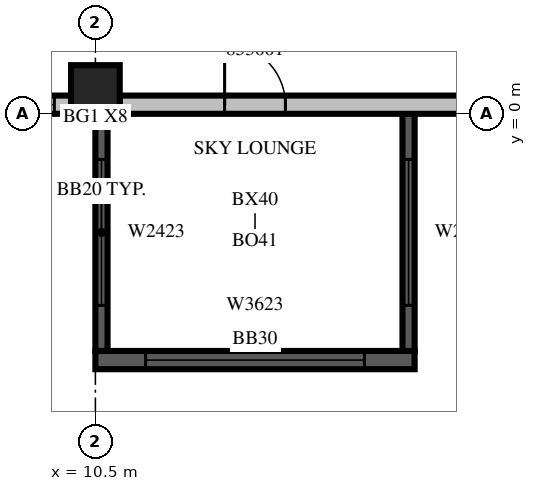
"""IFC4 building model, lengths in metres.
Left out: names, types, materials, properties, quantities, classifications, styles, units other than length and angle.
Written with IfcOpenShell. Run it as: python <this file> out.ifc"""

import sys

from ifc_helpers import new_model, si_unit, direction, frame, frame_2d, origin, origin_2d, place, context, subcontext, project, spatial, rectangle, extrude, source, transform, mapped, element, fill, save


model = new_model("IFC4")
c1 = context("Model", 3, precision=1e-05, world=origin(), true_north=direction((0.0, 1.0)))
c2 = subcontext(c1, "Body", "Model", "MODEL_VIEW")
j1 = project(units=[si_unit("LENGTHUNIT", "METRE"), si_unit("PLANEANGLEUNIT", "RADIAN")], contexts=[c1])
p1 = place(None, origin())
s1 = spatial("IfcSite", under=j1, at=p1, CompositionType="ELEMENT")
p2 = place(p1, origin())
s2 = spatial("IfcBuilding", under=s1, at=p2, CompositionType="ELEMENT")
p3 = place(p2, frame((0.0, 0.0, 234.8)))
s3 = spatial("IfcBuildingStorey", under=s2, at=p3, CompositionType="ELEMENT", Elevation=234.8)
m1 = source(origin(), c2, "Body", "SweptSolid", [
    extrude(rectangle(XDim=0.8, YDim=0.8, at=origin_2d()), origin(), (0.0, 0.0, 1.0), 3.8),
])
p4 = place(p3, frame((10.5, 0.4, 0.0), z_axis=(0.0, 0.0, 1.0), x_axis=(1.0, 0.0, 0.0)))
e1 = element("IfcColumn", 1, at=p4, inside=s3, PredefinedType="COLUMN", context=c2, shape_type="MappedRepresentation", body=[
    mapped(m1, transform((0.0, 0.0, 0.0), scale=1.0)),
])
m2 = source(origin(), c2, "Body", "SweptSolid", [
    extrude(rectangle(XDim=5.25, YDim=0.3, at=frame_2d((2.625, 0.0))), origin(), (0.0, 0.0, 1.0), 3.4),
])
p5 = place(p3, frame((10.5, -4.05, 0.0), z_axis=(0.0, 0.0, 1.0), x_axis=(1.0, 0.0, 0.0)))
e2 = element("IfcWall", 2, at=p5, inside=s3, PredefinedType="SOLIDWALL", context=c2, shape_type="MappedRepresentation", body=[
    mapped(m2, transform((0.0, 0.0, 0.0), scale=1.0)),
])
m3 = source(origin(), c2, "Body", "SweptSolid", [
    extrude(rectangle(XDim=3.6, YDim=2.3, at=frame_2d((1.8, 1.15))), frame((0.0, 0.16, 0.0), z_axis=(0.0, -1.0, 0.0), x_axis=(1.0, 0.0, 0.0)), (0.0, 0.0, 1.0), 0.32),
])
p6 = place(p5, frame((0.825, 0.0, 0.6)))
e3 = element("IfcOpeningElement", 3, at=p6, cuts=e2, PredefinedType="OPENING", context=c2, shape_type="MappedRepresentation", body=[
    mapped(m3, transform((0.0, 0.0, 0.0), scale=1.0)),
])
m4 = source(origin(), c2, "Body", "SweptSolid", [
    extrude(rectangle(XDim=3.9, YDim=0.2, at=frame_2d((1.95, 0.0))), origin(), (0.0, 0.0, 1.0), 3.4),
])
p7 = place(p3, frame((10.6, 0.0, 0.0), z_axis=(0.0, 0.0, 1.0), x_axis=(0.0, -1.0, 0.0)))
e4 = element("IfcWall", 4, at=p7, inside=s3, PredefinedType="SOLIDWALL", context=c2, shape_type="MappedRepresentation", body=[
    mapped(m4, transform((0.0, 0.0, 0.0), scale=1.0)),
])
m5 = source(origin(), c2, "Body", "SweptSolid", [
    extrude(rectangle(XDim=2.4, YDim=2.3, at=frame_2d((1.2, 1.15))), frame((0.0, 0.11, 0.0), z_axis=(0.0, -1.0, 0.0), x_axis=(1.0, 0.0, 0.0)), (0.0, 0.0, 1.0), 0.22),
])
p8 = place(p7, frame((0.75, 0.0, 0.6)))
e5 = element("IfcOpeningElement", 5, at=p8, cuts=e4, PredefinedType="OPENING", context=c2, shape_type="MappedRepresentation", body=[
    mapped(m5, transform((0.0, 0.0, 0.0), scale=1.0)),
])
p9 = place(p3, frame((15.65, 0.0, 0.0), z_axis=(0.0, 0.0, 1.0), x_axis=(0.0, -1.0, 0.0)))
e6 = element("IfcWall", 6, at=p9, inside=s3, PredefinedType="SOLIDWALL", context=c2, shape_type="MappedRepresentation", body=[
    mapped(m4, transform((0.0, 0.0, 0.0), scale=1.0)),
])
p10 = place(p9, frame((0.75, 0.0, 0.6)))
e7 = element("IfcOpeningElement", 7, at=p10, cuts=e6, PredefinedType="OPENING", context=c2, shape_type="MappedRepresentation", body=[
    mapped(m5, transform((0.0, 0.0, 0.0), scale=1.0)),
])
m6 = source(origin(), c2, "Body", "SweptSolid", [
    extrude(rectangle(XDim=5.9, YDim=0.3, at=frame_2d((2.95, 0.0))), origin(), (0.0, 0.0, 1.0), 3.4),
])
p11 = place(p3, frame((4.2, 0.15, 0.0), z_axis=(0.0, 0.0, 1.0), x_axis=(1.0, 0.0, 0.0)))
e8 = element("IfcWall", 8, at=p11, inside=s3, PredefinedType="STANDARD", context=c2, shape_type="MappedRepresentation", body=[
    mapped(m6, transform((0.0, 0.0, 0.0), scale=1.0)),
])
m7 = source(origin(), c2, "Body", "SweptSolid", [
    extrude(rectangle(XDim=1.8, YDim=2.3, at=frame_2d((0.9, 1.15))), frame((0.0, 0.16, 0.0), z_axis=(0.0, -1.0, 0.0), x_axis=(1.0, 0.0, 0.0)), (0.0, 0.0, 1.0), 0.32),
])
p12 = place(p11, frame((0.675, 0.0, 0.6)))
e9 = element("IfcOpeningElement", 9, at=p12, cuts=e8, PredefinedType="OPENING", context=c2, shape_type="MappedRepresentation", body=[
    mapped(m7, transform((0.0, 0.0, 0.0), scale=1.0)),
])
p13 = place(p11, frame((3.825, 0.0, 0.6)))
e10 = element("IfcOpeningElement", 10, at=p13, cuts=e8, PredefinedType="OPENING", context=c2, shape_type="MappedRepresentation", body=[
    mapped(m7, transform((0.0, 0.0, 0.0), scale=1.0)),
])
m8 = source(origin(), c2, "Body", "SweptSolid", [
    extrude(rectangle(XDim=9.7, YDim=0.3, at=frame_2d((4.85, 0.0))), origin(), (0.0, 0.0, 1.0), 3.4),
])
p14 = place(p3, frame((10.9, 0.15, 0.0), z_axis=(0.0, 0.0, 1.0), x_axis=(1.0, 0.0, 0.0)))
e11 = element("IfcWall", 11, at=p14, inside=s3, PredefinedType="STANDARD", context=c2, shape_type="MappedRepresentation", body=[
    mapped(m8, transform((0.0, 0.0, 0.0), scale=1.0)),
])
p15 = place(p14, frame((5.675, 0.0, 0.6)))
e12 = element("IfcOpeningElement", 12, at=p15, cuts=e11, PredefinedType="OPENING", context=c2, shape_type="MappedRepresentation", body=[
    mapped(m3, transform((0.0, 0.0, 0.0), scale=1.0)),
])
m9 = source(origin(), c2, "Body", "SweptSolid", [
    extrude(rectangle(XDim=1.0, YDim=2.1, at=frame_2d((0.5, 1.05))), frame((0.0, 0.16, 0.0), z_axis=(0.0, -1.0, 0.0), x_axis=(1.0, 0.0, 0.0)), (0.0, 0.0, 1.0), 0.32),
])
p16 = place(p14, frame((1.725, 0.0, 0.0)))
e13 = element("IfcOpeningElement", 13, at=p16, cuts=e11, PredefinedType="OPENING", context=c2, shape_type="MappedRepresentation", body=[
    mapped(m9, transform((0.0, 0.0, 0.0), scale=1.0)),
])
m10 = source(origin(), c2, "Body", "SweptSolid", [
    extrude(rectangle(XDim=3.6, YDim=2.3, at=frame_2d((1.8, 1.15))), frame((0.0, 0.03, 0.0), z_axis=(0.0, -1.0, 0.0), x_axis=(1.0, 0.0, 0.0)), (0.0, 0.0, 1.0), 0.06),
])
p17 = place(p6, origin())
e14 = element("IfcWindow", 14, at=p17, inside=s3, PartitioningType="SINGLE_PANEL", PredefinedType="WINDOW", context=c2, shape_type="MappedRepresentation", body=[
    mapped(m10, transform((0.0, 0.0, 0.0), scale=1.0)),
])
fill(e3, e14)
m11 = source(origin(), c2, "Body", "SweptSolid", [
    extrude(rectangle(XDim=2.4, YDim=2.3, at=frame_2d((1.2, 1.15))), frame((0.0, 0.03, 0.0), z_axis=(0.0, -1.0, 0.0), x_axis=(1.0, 0.0, 0.0)), (0.0, 0.0, 1.0), 0.06),
])
p18 = place(p8, origin())
e15 = element("IfcWindow", 15, at=p18, inside=s3, PartitioningType="SINGLE_PANEL", PredefinedType="WINDOW", context=c2, shape_type="MappedRepresentation", body=[
    mapped(m11, transform((0.0, 0.0, 0.0), scale=1.0)),
])
fill(e5, e15)
p19 = place(p10, origin())
e16 = element("IfcWindow", 16, at=p19, inside=s3, PartitioningType="SINGLE_PANEL", PredefinedType="WINDOW", context=c2, shape_type="MappedRepresentation", body=[
    mapped(m11, transform((0.0, 0.0, 0.0), scale=1.0)),
])
fill(e7, e16)
m12 = source(origin(), c2, "Body", "SweptSolid", [
    extrude(rectangle(XDim=1.8, YDim=2.3, at=frame_2d((0.9, 1.15))), frame((0.0, 0.03, 0.0), z_axis=(0.0, -1.0, 0.0), x_axis=(1.0, 0.0, 0.0)), (0.0, 0.0, 1.0), 0.06),
])
p20 = place(p13, origin())
e17 = element("IfcWindow", 17, at=p20, inside=s3, PartitioningType="SINGLE_PANEL", PredefinedType="WINDOW", context=c2, shape_type="MappedRepresentation", body=[
    mapped(m12, transform((0.0, 0.0, 0.0), scale=1.0)),
])
fill(e10, e17)
m13 = source(origin(), c2, "Body", "SweptSolid", [
    extrude(rectangle(XDim=1.0, YDim=2.1, at=frame_2d((0.5, 1.05))), frame((0.0, 0.025, 0.0), z_axis=(0.0, -1.0, 0.0), x_axis=(1.0, 0.0, 0.0)), (0.0, 0.0, 1.0), 0.05),
])
p21 = place(p16, origin())
e18 = element("IfcDoor", 18, at=p21, inside=s3, OperationType="SINGLE_SWING_LEFT", PredefinedType="DOOR", context=c2, shape_type="MappedRepresentation", body=[
    mapped(m13, transform((0.0, 0.0, 0.0), scale=1.0)),
])
fill(e13, e18)
save(model, sys.argv[1])
